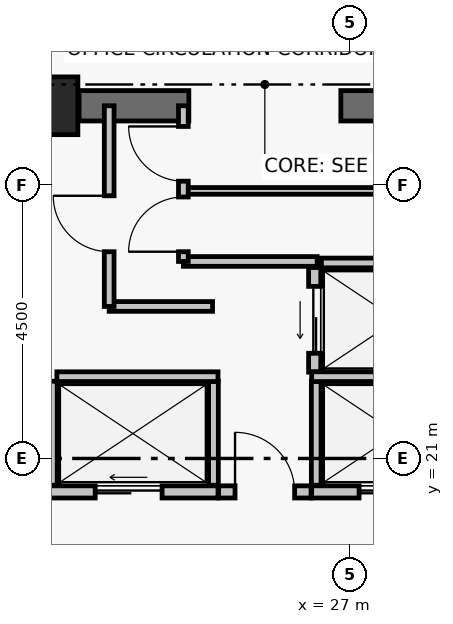
"""IFC4 building model, lengths in metres.
Left out: names, types, materials, properties, quantities, classifications, styles, units other than length and angle.
Written with IfcOpenShell. Run it as: python <this file> out.ifc"""

import sys

from ifc_helpers import new_model, si_unit, direction, frame, frame_2d, origin, origin_2d, place, context, subcontext, project, spatial, rectangle, extrude, element, fill, save


model = new_model("IFC4")
c1 = context("Model", 3, precision=1e-05, world=origin(), true_north=direction((0.0, 1.0)))
c2 = subcontext(c1, "Body", "Model", "MODEL_VIEW")
j1 = project(units=[si_unit("LENGTHUNIT", "METRE"), si_unit("PLANEANGLEUNIT", "RADIAN")], contexts=[c1])
p1 = place(None, origin())
s1 = spatial("IfcSite", under=j1, at=p1, CompositionType="ELEMENT")
p2 = place(p1, origin())
s2 = spatial("IfcBuilding", under=s1, at=p2, CompositionType="ELEMENT")
p3 = place(p2, frame((0.0, 0.0, 219.54)))
s3 = spatial("IfcBuildingStorey", under=s2, at=p3, CompositionType="ELEMENT", Elevation=219.54)
p4 = place(p3, frame((22.05, 26.8, 0.0), z_axis=(0.0, 0.0, 1.0), x_axis=(1.0, 0.0, 0.0)))
e1 = element("IfcColumn", 1, at=p4, inside=s3, PredefinedType="COLUMN", context=c2, shape_type="SweptSolid", body=[
    extrude(rectangle(XDim=0.95, YDim=0.95, at=origin_2d()), origin(), (0.0, 0.0, 1.0), 3.72),
])
p5 = place(p3, frame((22.545, 26.8, 0.0), z_axis=(0.0, 0.0, 1.0), x_axis=(1.0, 0.0, 0.0)))
e2 = element("IfcWall", 2, at=p5, inside=s3, PredefinedType="SHEAR", context=c2, shape_type="SweptSolid", body=[
    extrude(rectangle(XDim=1.805, YDim=0.5, at=frame_2d((0.903, 0.0))), origin(), (0.0, 0.0, 1.0), 3.5),
])
p6 = place(p3, frame((26.85, 26.8, 0.0), z_axis=(0.0, 0.0, 1.0), x_axis=(1.0, 0.0, 0.0)))
e3 = element("IfcWall", 3, at=p6, inside=s3, PredefinedType="SHEAR", context=c2, shape_type="SweptSolid", body=[
    extrude(rectangle(XDim=1.805, YDim=0.5, at=frame_2d((0.902, 0.0))), origin(), (0.0, 0.0, 1.0), 3.5),
])
p7 = place(p3, frame((24.84, 20.45, 0.0), z_axis=(0.0, 0.0, 1.0), x_axis=(1.0, 0.0, 0.0)))
e4 = element("IfcWall", 4, at=p7, inside=s3, PredefinedType="PARTITIONING", context=c2, shape_type="SweptSolid", body=[
    extrude(rectangle(XDim=1.52, YDim=0.2, at=frame_2d((0.76, 0.0))), origin(), (0.0, 0.0, 1.0), 3.5),
])
p8 = place(p7, frame((0.27, 0.0, 0.0)))
e5 = element("IfcOpeningElement", 5, at=p8, cuts=e4, PredefinedType="OPENING", context=c2, shape_type="SweptSolid", body=[
    extrude(rectangle(XDim=0.98, YDim=2.06, at=frame_2d((0.49, 1.03))), frame((0.0, 0.11, 0.0), z_axis=(0.0, -1.0, 0.0), x_axis=(1.0, 0.0, 0.0)), (0.0, 0.0, 1.0), 0.22),
])
p9 = place(p3, frame((22.03, 20.45, 0.0), z_axis=(0.0, 0.0, 1.0), x_axis=(1.0, 0.0, 0.0)))
e6 = element("IfcWall", 6, at=p9, inside=s3, PredefinedType="PARTITIONING", context=c2, shape_type="SweptSolid", body=[
    extrude(rectangle(XDim=2.8, YDim=0.2, at=frame_2d((1.4, 0.0))), origin(), (0.0, 0.0, 1.0), 3.5),
])
p10 = place(p9, frame((0.78, 0.0, 0.0)))
e7 = element("IfcOpeningElement", 7, at=p10, cuts=e6, PredefinedType="OPENING", context=c2, shape_type="SweptSolid", body=[
    extrude(rectangle(XDim=1.1, YDim=2.08, at=frame_2d((0.55, 1.04))), frame((0.0, 0.11, 0.0), z_axis=(0.0, -1.0, 0.0), x_axis=(1.0, 0.0, 0.0)), (0.0, 0.0, 1.0), 0.22),
])
p11 = place(p3, frame((26.37, 20.45, 0.0), z_axis=(0.0, 0.0, 1.0), x_axis=(1.0, 0.0, 0.0)))
e8 = element("IfcWall", 8, at=p11, inside=s3, PredefinedType="PARTITIONING", context=c2, shape_type="SweptSolid", body=[
    extrude(rectangle(XDim=2.8, YDim=0.2, at=frame_2d((1.4, 0.0))), origin(), (0.0, 0.0, 1.0), 3.5),
])
p12 = place(p11, frame((0.78, 0.0, 0.0)))
e9 = element("IfcOpeningElement", 9, at=p12, cuts=e8, PredefinedType="OPENING", context=c2, shape_type="SweptSolid", body=[
    extrude(rectangle(XDim=1.1, YDim=2.08, at=frame_2d((0.55, 1.04))), frame((0.0, 0.11, 0.0), z_axis=(0.0, -1.0, 0.0), x_axis=(1.0, 0.0, 0.0)), (0.0, 0.0, 1.0), 0.22),
])
p13 = place(p3, frame((26.42, 22.42, 0.0), z_axis=(0.0, 0.0, 1.0), x_axis=(0.0, 1.0, 0.0)))
e10 = element("IfcWall", 10, at=p13, inside=s3, PredefinedType="PARTITIONING", context=c2, shape_type="SweptSolid", body=[
    extrude(rectangle(XDim=1.72, YDim=0.2, at=frame_2d((0.86, 0.0))), origin(), (0.0, 0.0, 1.0), 3.5),
])
p14 = place(p13, frame((0.31, 0.0, 0.0)))
e11 = element("IfcOpeningElement", 11, at=p14, cuts=e10, PredefinedType="OPENING", context=c2, shape_type="SweptSolid", body=[
    extrude(rectangle(XDim=1.1, YDim=2.08, at=frame_2d((0.55, 1.04))), frame((0.0, 0.11, 0.0), z_axis=(0.0, -1.0, 0.0), x_axis=(1.0, 0.0, 0.0)), (0.0, 0.0, 1.0), 0.22),
])
for number, where, z_axis, x_axis in (
    (12, (22.105, 20.56, 0.0), (0.0, 0.0, 1.0), (0.0, 1.0, 0.0)),
    (13, (24.755, 20.56, 0.0), (0.0, 0.0, 1.0), (0.0, 1.0, 0.0)),
):
    element("IfcWall", number, at=place(p3, frame(where, z_axis=z_axis, x_axis=x_axis)), inside=s3, PredefinedType="PARTITIONING", context=c2, shape_type="SweptSolid", body=[
        extrude(rectangle(XDim=1.71, YDim=0.16, at=frame_2d((0.855, 0.0))), origin(), (0.0, 0.0, 1.0), 3.5),
    ])
p15 = place(p3, frame((22.18, 22.345, 0.0), z_axis=(0.0, 0.0, 1.0), x_axis=(1.0, 0.0, 0.0)))
e14 = element("IfcWall", 14, at=p15, inside=s3, PredefinedType="PARTITIONING", context=c2, shape_type="SweptSolid", body=[
    extrude(rectangle(XDim=2.65, YDim=0.16, at=frame_2d((1.325, 0.0))), origin(), (0.0, 0.0, 1.0), 3.5),
])
p16 = place(p3, frame((26.445, 20.56, 0.0), z_axis=(0.0, 0.0, 1.0), x_axis=(0.0, 1.0, 0.0)))
e15 = element("IfcWall", 15, at=p16, inside=s3, PredefinedType="PARTITIONING", context=c2, shape_type="SweptSolid", body=[
    extrude(rectangle(XDim=1.71, YDim=0.16, at=frame_2d((0.855, 0.0))), origin(), (0.0, 0.0, 1.0), 3.5),
])
p17 = place(p3, frame((26.37, 22.345, 0.0), z_axis=(0.0, 0.0, 1.0), x_axis=(1.0, 0.0, 0.0)))
e16 = element("IfcWall", 16, at=p17, inside=s3, PredefinedType="PARTITIONING", context=c2, shape_type="SweptSolid", body=[
    extrude(rectangle(XDim=2.65, YDim=0.16, at=frame_2d((1.325, 0.0))), origin(), (0.0, 0.0, 1.0), 3.5),
])
p18 = place(p3, frame((26.53, 24.215, 0.0), z_axis=(0.0, 0.0, 1.0), x_axis=(1.0, 0.0, 0.0)))
e17 = element("IfcWall", 17, at=p18, inside=s3, PredefinedType="PARTITIONING", context=c2, shape_type="SweptSolid", body=[
    extrude(rectangle(XDim=2.49, YDim=0.16, at=frame_2d((1.245, 0.0))), origin(), (0.0, 0.0, 1.0), 3.5),
])
p19 = place(p3, frame((23.04, 23.5, 0.0), z_axis=(0.0, 0.0, 1.0), x_axis=(1.0, 0.0, 0.0)))
e18 = element("IfcWall", 18, at=p19, inside=s3, PredefinedType="PARTITIONING", context=c2, shape_type="SweptSolid", body=[
    extrude(rectangle(XDim=1.7, YDim=0.16, at=frame_2d((0.85, 0.0))), origin(), (0.0, 0.0, 1.0), 3.5),
])
p20 = place(p3, frame((23.04, 23.5, 0.0), z_axis=(0.0, 0.0, 1.0), x_axis=(0.0, 1.0, 0.0)))
e19 = element("IfcWall", 19, at=p20, inside=s3, PredefinedType="PARTITIONING", context=c2, shape_type="SweptSolid", body=[
    extrude(rectangle(XDim=3.3, YDim=0.16, at=frame_2d((1.65, 0.0))), origin(), (0.0, 0.0, 1.0), 2.63),
])
p21 = place(p20, frame((0.9, 0.0, 0.0)))
e20 = element("IfcOpeningElement", 20, at=p21, cuts=e19, PredefinedType="OPENING", context=c2, shape_type="SweptSolid", body=[
    extrude(rectangle(XDim=0.92, YDim=2.05, at=frame_2d((0.46, 1.025))), frame((0.0, 0.09, 0.0), z_axis=(0.0, -1.0, 0.0), x_axis=(1.0, 0.0, 0.0)), (0.0, 0.0, 1.0), 0.18),
])
p22 = place(p3, frame((24.26, 24.24, 0.0), z_axis=(0.0, 0.0, 1.0), x_axis=(1.0, 0.0, 0.0)))
e21 = element("IfcWall", 21, at=p22, inside=s3, PredefinedType="PARTITIONING", context=c2, shape_type="SweptSolid", body=[
    extrude(rectangle(XDim=2.2, YDim=0.16, at=frame_2d((1.1, 0.0))), origin(), (0.0, 0.0, 1.0), 3.5),
])
p23 = place(p3, frame((24.26, 25.4, 0.0), z_axis=(0.0, 0.0, 1.0), x_axis=(1.0, 0.0, 0.0)))
e22 = element("IfcWall", 22, at=p23, inside=s3, PredefinedType="PARTITIONING", context=c2, shape_type="SweptSolid", body=[
    extrude(rectangle(XDim=4.76, YDim=0.11, at=frame_2d((2.38, 0.0))), origin(), (0.0, 0.0, 1.0), 3.5),
])
p24 = place(p3, frame((24.26, 24.24, 0.0), z_axis=(0.0, 0.0, 1.0), x_axis=(0.0, 1.0, 0.0)))
e23 = element("IfcWall", 23, at=p24, inside=s3, PredefinedType="PARTITIONING", context=c2, shape_type="SweptSolid", body=[
    extrude(rectangle(XDim=2.56, YDim=0.16, at=frame_2d((1.28, 0.0))), origin(), (0.0, 0.0, 1.0), 2.63),
])
p25 = place(p24, frame((0.16, 0.0, 0.0)))
e24 = element("IfcOpeningElement", 24, at=p25, cuts=e23, PredefinedType="OPENING", context=c2, shape_type="SweptSolid", body=[
    extrude(rectangle(XDim=0.9, YDim=2.02, at=frame_2d((0.45, 1.01))), frame((0.0, 0.09, 0.0), z_axis=(0.0, -1.0, 0.0), x_axis=(1.0, 0.0, 0.0)), (0.0, 0.0, 1.0), 0.18),
])
p26 = place(p24, frame((1.32, 0.0, 0.0)))
e25 = element("IfcOpeningElement", 25, at=p26, cuts=e23, PredefinedType="OPENING", context=c2, shape_type="SweptSolid", body=[
    extrude(rectangle(XDim=0.9, YDim=2.02, at=frame_2d((0.45, 1.01))), frame((0.0, 0.09, 0.0), z_axis=(0.0, -1.0, 0.0), x_axis=(1.0, 0.0, 0.0)), (0.0, 0.0, 1.0), 0.18),
])
p27 = place(p8, origin())
e26 = element("IfcDoor", 26, at=p27, inside=s3, OperationType="SINGLE_SWING_LEFT", PredefinedType="DOOR", context=c2, shape_type="SweptSolid", body=[
    extrude(rectangle(XDim=0.98, YDim=2.06, at=frame_2d((0.49, 1.03))), frame((0.0, 0.025, 0.0), z_axis=(0.0, -1.0, 0.0), x_axis=(1.0, 0.0, 0.0)), (0.0, 0.0, 1.0), 0.05),
])
fill(e5, e26)
p28 = place(p10, origin())
e27 = element("IfcDoor", 27, at=p28, inside=s3, OperationType="DOUBLE_DOOR_SLIDING", PredefinedType="DOOR", context=c2, shape_type="SweptSolid", body=[
    extrude(rectangle(XDim=1.1, YDim=2.08, at=frame_2d((0.55, 1.04))), frame((0.0, 0.025, 0.0), z_axis=(0.0, -1.0, 0.0), x_axis=(1.0, 0.0, 0.0)), (0.0, 0.0, 1.0), 0.05),
])
fill(e7, e27)
p29 = place(p12, origin())
e28 = element("IfcDoor", 28, at=p29, inside=s3, OperationType="DOUBLE_DOOR_SLIDING", PredefinedType="DOOR", context=c2, shape_type="SweptSolid", body=[
    extrude(rectangle(XDim=1.1, YDim=2.08, at=frame_2d((0.55, 1.04))), frame((0.0, 0.025, 0.0), z_axis=(0.0, -1.0, 0.0), x_axis=(1.0, 0.0, 0.0)), (0.0, 0.0, 1.0), 0.05),
])
fill(e9, e28)
p30 = place(p14, origin())
e29 = element("IfcDoor", 29, at=p30, inside=s3, OperationType="DOUBLE_DOOR_SLIDING", PredefinedType="DOOR", context=c2, shape_type="SweptSolid", body=[
    extrude(rectangle(XDim=1.1, YDim=2.08, at=frame_2d((0.55, 1.04))), frame((0.0, 0.025, 0.0), z_axis=(0.0, -1.0, 0.0), x_axis=(1.0, 0.0, 0.0)), (0.0, 0.0, 1.0), 0.05),
])
fill(e11, e29)
p31 = place(p21, origin())
e30 = element("IfcDoor", 30, at=p31, inside=s3, OperationType="SINGLE_SWING_RIGHT", PredefinedType="DOOR", context=c2, shape_type="SweptSolid", body=[
    extrude(rectangle(XDim=0.92, YDim=2.05, at=frame_2d((0.46, 1.025))), frame((0.0, 0.025, 0.0), z_axis=(0.0, -1.0, 0.0), x_axis=(1.0, 0.0, 0.0)), (0.0, 0.0, 1.0), 0.05),
])
fill(e20, e30)
p32 = place(p25, origin())
e31 = element("IfcDoor", 31, at=p32, inside=s3, OperationType="SINGLE_SWING_LEFT", PredefinedType="DOOR", context=c2, shape_type="SweptSolid", body=[
    extrude(rectangle(XDim=0.9, YDim=2.02, at=frame_2d((0.45, 1.01))), frame((0.0, 0.025, 0.0), z_axis=(0.0, -1.0, 0.0), x_axis=(1.0, 0.0, 0.0)), (0.0, 0.0, 1.0), 0.05),
])
fill(e24, e31)
p33 = place(p26, origin())
e32 = element("IfcDoor", 32, at=p33, inside=s3, OperationType="SINGLE_SWING_RIGHT", PredefinedType="DOOR", context=c2, shape_type="SweptSolid", body=[
    extrude(rectangle(XDim=0.9, YDim=2.02, at=frame_2d((0.45, 1.01))), frame((0.0, 0.025, 0.0), z_axis=(0.0, -1.0, 0.0), x_axis=(1.0, 0.0, 0.0)), (0.0, 0.0, 1.0), 0.05),
])
fill(e25, e32)
save(model, sys.argv[1])
